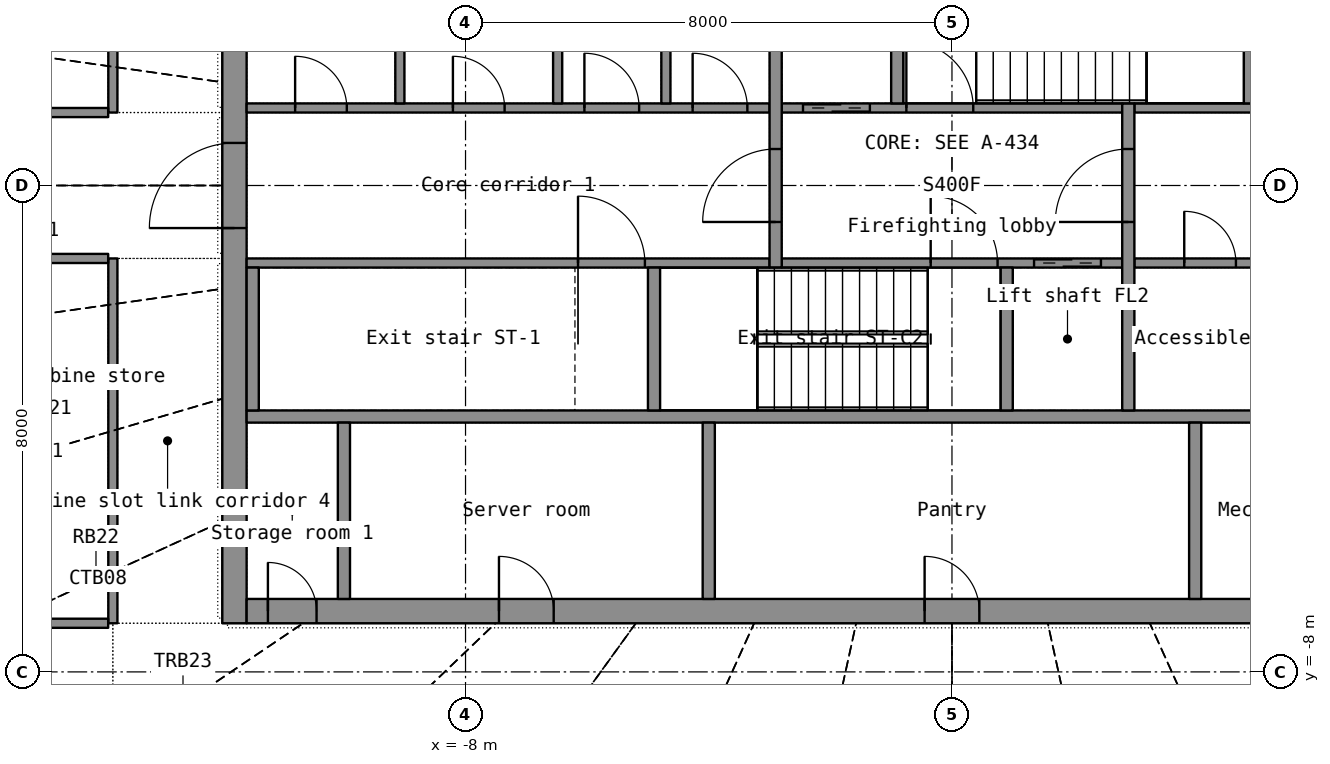
"""IFC4 building model, lengths in metres.
Left out: names, types, materials, properties, quantities, classifications, styles, units other than length and angle.
Written with IfcOpenShell. Run it as: python <this file> out.ifc"""

import sys

from ifc_helpers import new_model, si_unit, direction, frame, frame_2d, origin, place, context, subcontext, project, spatial, rectangle, extrude, element, fill, save


model = new_model("IFC4")
c1 = context("Model", 3, precision=1e-05, world=origin(), true_north=direction((0.0, 1.0)))
c2 = subcontext(c1, "Body", "Model", "MODEL_VIEW")
j1 = project(units=[si_unit("LENGTHUNIT", "METRE"), si_unit("PLANEANGLEUNIT", "RADIAN")], contexts=[c1])
p1 = place(None, origin())
s1 = spatial("IfcSite", under=j1, at=p1, CompositionType="ELEMENT")
p2 = place(p1, origin())
s2 = spatial("IfcBuilding", under=s1, at=p2, CompositionType="ELEMENT")
p3 = place(p2, frame((0.0, 0.0, 265.2)))
s3 = spatial("IfcBuildingStorey", under=s2, at=p3, CompositionType="ELEMENT", Elevation=265.2)
p4 = place(p3, frame((-11.8, -7.2, 0.0), z_axis=(0.0, 0.0, 1.0), x_axis=(0.0, 1.0, 0.0)))
e1 = element("IfcWall", 1, at=p4, inside=s3, PredefinedType="SHEAR", context=c2, shape_type="SweptSolid", body=[
    extrude(rectangle(XDim=14.4, YDim=0.4, at=frame_2d((7.2, 0.0))), origin(), (0.0, 0.0, 1.0), 6.9),
])
p5 = place(p4, frame((6.5, 0.0, 0.0)))
e2 = element("IfcOpeningElement", 2, at=p5, cuts=e1, PredefinedType="OPENING", context=c2, shape_type="SweptSolid", body=[
    extrude(rectangle(XDim=1.4, YDim=2.2, at=frame_2d((0.7, 1.1))), frame((0.0, 0.21, 0.0), z_axis=(0.0, -1.0, 0.0), x_axis=(1.0, 0.0, 0.0)), (0.0, 0.0, 1.0), 0.42),
])
p6 = place(p3, frame((-11.6, -7.0, 0.0), z_axis=(0.0, 0.0, 1.0), x_axis=(1.0, 0.0, 0.0)))
e3 = element("IfcWall", 3, at=p6, inside=s3, PredefinedType="SHEAR", context=c2, shape_type="SweptSolid", body=[
    extrude(rectangle(XDim=23.2, YDim=0.4, at=frame_2d((11.6, 0.0))), origin(), (0.0, 0.0, 1.0), 6.9),
])
p7 = place(p6, frame((20.05, 0.0, 0.0)))
e4 = element("IfcOpeningElement", 4, at=p7, cuts=e3, PredefinedType="OPENING", context=c2, shape_type="SweptSolid", body=[
    extrude(rectangle(XDim=1.1, YDim=2.2, at=frame_2d((0.55, 1.1))), frame((0.0, 0.21, 0.0), z_axis=(0.0, -1.0, 0.0), x_axis=(1.0, 0.0, 0.0)), (0.0, 0.0, 1.0), 0.42),
])
p8 = place(p6, frame((4.15, 0.0, 0.0)))
e5 = element("IfcOpeningElement", 5, at=p8, cuts=e3, PredefinedType="OPENING", context=c2, shape_type="SweptSolid", body=[
    extrude(rectangle(XDim=0.9, YDim=2.1, at=frame_2d((0.45, 1.05))), frame((0.0, 0.21, 0.0), z_axis=(0.0, -1.0, 0.0), x_axis=(1.0, 0.0, 0.0)), (0.0, 0.0, 1.0), 0.42),
])
p9 = place(p6, frame((11.15, 0.0, 0.0)))
e6 = element("IfcOpeningElement", 6, at=p9, cuts=e3, PredefinedType="OPENING", context=c2, shape_type="SweptSolid", body=[
    extrude(rectangle(XDim=0.9, YDim=2.1, at=frame_2d((0.45, 1.05))), frame((0.0, 0.21, 0.0), z_axis=(0.0, -1.0, 0.0), x_axis=(1.0, 0.0, 0.0)), (0.0, 0.0, 1.0), 0.42),
])
p10 = place(p6, frame((17.15, 0.0, 0.0)))
e7 = element("IfcOpeningElement", 7, at=p10, cuts=e3, PredefinedType="OPENING", context=c2, shape_type="SweptSolid", body=[
    extrude(rectangle(XDim=0.9, YDim=2.1, at=frame_2d((0.45, 1.05))), frame((0.0, 0.21, 0.0), z_axis=(0.0, -1.0, 0.0), x_axis=(1.0, 0.0, 0.0)), (0.0, 0.0, 1.0), 0.42),
])
p11 = place(p6, frame((0.35, 0.0, 0.0)))
e8 = element("IfcOpeningElement", 8, at=p11, cuts=e3, PredefinedType="OPENING", context=c2, shape_type="SweptSolid", body=[
    extrude(rectangle(XDim=0.8, YDim=2.05, at=frame_2d((0.4, 1.025))), frame((0.0, 0.21, 0.0), z_axis=(0.0, -1.0, 0.0), x_axis=(1.0, 0.0, 0.0)), (0.0, 0.0, 1.0), 0.42),
])
p12 = place(p6, frame((22.05, 0.0, 0.0)))
e9 = element("IfcOpeningElement", 9, at=p12, cuts=e3, PredefinedType="OPENING", context=c2, shape_type="SweptSolid", body=[
    extrude(rectangle(XDim=0.8, YDim=2.05, at=frame_2d((0.4, 1.025))), frame((0.0, 0.21, 0.0), z_axis=(0.0, -1.0, 0.0), x_axis=(1.0, 0.0, 0.0)), (0.0, 0.0, 1.0), 0.42),
])
p13 = place(p3, frame((-11.6, -3.8, 0.0), z_axis=(0.0, 0.0, 1.0), x_axis=(1.0, 0.0, 0.0)))
e10 = element("IfcWall", 10, at=p13, inside=s3, PredefinedType="SHEAR", context=c2, shape_type="SweptSolid", body=[
    extrude(rectangle(XDim=23.2, YDim=0.2, at=frame_2d((11.6, 0.0))), origin(), (0.0, 0.0, 1.0), 6.9),
])
p14 = place(p3, frame((-10.0, -6.8, 0.0), z_axis=(0.0, 0.0, 1.0), x_axis=(0.0, 1.0, 0.0)))
e11 = element("IfcWall", 11, at=p14, inside=s3, PredefinedType="SHEAR", context=c2, shape_type="SweptSolid", body=[
    extrude(rectangle(XDim=2.9, YDim=0.2, at=frame_2d((1.45, 0.0))), origin(), (0.0, 0.0, 1.0), 6.9),
])
for number, where, z_axis, x_axis in (
    (12, (-4.0, -6.8, 0.0), (0.0, 0.0, 1.0), (0.0, 1.0, 0.0)),
    (13, (4.0, -6.8, 0.0), (0.0, 0.0, 1.0), (0.0, 1.0, 0.0)),
):
    element("IfcWall", number, at=place(p3, frame(where, z_axis=z_axis, x_axis=x_axis)), inside=s3, PredefinedType="PARTITIONING", context=c2, shape_type="SweptSolid", body=[
        extrude(rectangle(XDim=2.9, YDim=0.2, at=frame_2d((1.45, 0.0))), origin(), (0.0, 0.0, 1.0), 6.9),
    ])
p15 = place(p3, frame((-11.6, -1.275, 0.0), z_axis=(0.0, 0.0, 1.0), x_axis=(1.0, 0.0, 0.0)))
e14 = element("IfcWall", 14, at=p15, inside=s3, PredefinedType="SHEAR", context=c2, shape_type="SweptSolid", body=[
    extrude(rectangle(XDim=8.6, YDim=0.15, at=frame_2d((4.3, 0.0))), origin(), (0.0, 0.0, 1.0), 6.9),
])
p16 = place(p15, frame((5.45, 0.0, 0.0)))
e15 = element("IfcOpeningElement", 15, at=p16, cuts=e14, PredefinedType="OPENING", context=c2, shape_type="SweptSolid", body=[
    extrude(rectangle(XDim=1.1, YDim=2.15, at=frame_2d((0.55, 1.075))), frame((0.0, 0.085, 0.0), z_axis=(0.0, -1.0, 0.0), x_axis=(1.0, 0.0, 0.0)), (0.0, 0.0, 1.0), 0.17),
])
p17 = place(p3, frame((-2.8, -1.275, 0.0), z_axis=(0.0, 0.0, 1.0), x_axis=(1.0, 0.0, 0.0)))
e16 = element("IfcWall", 16, at=p17, inside=s3, PredefinedType="SHEAR", context=c2, shape_type="SweptSolid", body=[
    extrude(rectangle(XDim=5.6, YDim=0.15, at=frame_2d((2.8, 0.0))), origin(), (0.0, 0.0, 1.0), 6.9),
])
p18 = place(p17, frame((4.15, 0.0, 0.0)))
e17 = element("IfcOpeningElement", 17, at=p18, cuts=e16, PredefinedType="OPENING", context=c2, shape_type="SweptSolid", body=[
    extrude(rectangle(XDim=1.1, YDim=2.2, at=frame_2d((0.55, 1.1))), frame((0.0, 0.085, 0.0), z_axis=(0.0, -1.0, 0.0), x_axis=(1.0, 0.0, 0.0)), (0.0, 0.0, 1.0), 0.17),
])
p19 = place(p17, frame((2.45, 0.0, 0.0)))
e18 = element("IfcOpeningElement", 18, at=p19, cuts=e16, PredefinedType="OPENING", context=c2, shape_type="SweptSolid", body=[
    extrude(rectangle(XDim=1.1, YDim=2.15, at=frame_2d((0.55, 1.075))), frame((0.0, 0.085, 0.0), z_axis=(0.0, -1.0, 0.0), x_axis=(1.0, 0.0, 0.0)), (0.0, 0.0, 1.0), 0.17),
])
p20 = place(p3, frame((3.0, -1.275, 0.0), z_axis=(0.0, 0.0, 1.0), x_axis=(1.0, 0.0, 0.0)))
e19 = element("IfcWall", 19, at=p20, inside=s3, PredefinedType="PARTITIONING", context=c2, shape_type="SweptSolid", body=[
    extrude(rectangle(XDim=8.6, YDim=0.15, at=frame_2d((4.3, 0.0))), origin(), (0.0, 0.0, 1.0), 6.9),
])
p21 = place(p20, frame((0.82, 0.0, 0.0)))
e20 = element("IfcOpeningElement", 20, at=p21, cuts=e19, PredefinedType="OPENING", context=c2, shape_type="SweptSolid", body=[
    extrude(rectangle(XDim=0.85, YDim=2.1, at=frame_2d((0.425, 1.05))), frame((0.0, 0.085, 0.0), z_axis=(0.0, -1.0, 0.0), x_axis=(1.0, 0.0, 0.0)), (0.0, 0.0, 1.0), 0.17),
])
p22 = place(p20, frame((3.103, 0.0, 0.0)))
e21 = element("IfcOpeningElement", 21, at=p22, cuts=e19, PredefinedType="OPENING", context=c2, shape_type="SweptSolid", body=[
    extrude(rectangle(XDim=0.9, YDim=2.1, at=frame_2d((0.45, 1.05))), frame((0.0, 0.085, 0.0), z_axis=(0.0, -1.0, 0.0), x_axis=(1.0, 0.0, 0.0)), (0.0, 0.0, 1.0), 0.17),
])
p23 = place(p20, frame((6.158, 0.0, 0.0)))
e22 = element("IfcOpeningElement", 22, at=p23, cuts=e19, PredefinedType="OPENING", context=c2, shape_type="SweptSolid", body=[
    extrude(rectangle(XDim=0.9, YDim=2.1, at=frame_2d((0.45, 1.05))), frame((0.0, 0.085, 0.0), z_axis=(0.0, -1.0, 0.0), x_axis=(1.0, 0.0, 0.0)), (0.0, 0.0, 1.0), 0.17),
])
p24 = place(p3, frame((-11.6, 1.275, 0.0), z_axis=(0.0, 0.0, 1.0), x_axis=(1.0, 0.0, 0.0)))
e23 = element("IfcWall", 23, at=p24, inside=s3, PredefinedType="PARTITIONING", context=c2, shape_type="SweptSolid", body=[
    extrude(rectangle(XDim=8.6, YDim=0.15, at=frame_2d((4.3, 0.0))), origin(), (0.0, 0.0, 1.0), 6.9),
])
p25 = place(p24, frame((0.798, 0.0, 0.0)))
e24 = element("IfcOpeningElement", 24, at=p25, cuts=e23, PredefinedType="OPENING", context=c2, shape_type="SweptSolid", body=[
    extrude(rectangle(XDim=0.85, YDim=2.1, at=frame_2d((0.425, 1.05))), frame((0.0, 0.085, 0.0), z_axis=(0.0, -1.0, 0.0), x_axis=(1.0, 0.0, 0.0)), (0.0, 0.0, 1.0), 0.17),
])
p26 = place(p24, frame((3.393, 0.0, 0.0)))
e25 = element("IfcOpeningElement", 25, at=p26, cuts=e23, PredefinedType="OPENING", context=c2, shape_type="SweptSolid", body=[
    extrude(rectangle(XDim=0.85, YDim=2.1, at=frame_2d((0.425, 1.05))), frame((0.0, 0.085, 0.0), z_axis=(0.0, -1.0, 0.0), x_axis=(1.0, 0.0, 0.0)), (0.0, 0.0, 1.0), 0.17),
])
p27 = place(p24, frame((5.555, 0.0, 0.0)))
e26 = element("IfcOpeningElement", 26, at=p27, cuts=e23, PredefinedType="OPENING", context=c2, shape_type="SweptSolid", body=[
    extrude(rectangle(XDim=0.9, YDim=2.1, at=frame_2d((0.45, 1.05))), frame((0.0, 0.085, 0.0), z_axis=(0.0, -1.0, 0.0), x_axis=(1.0, 0.0, 0.0)), (0.0, 0.0, 1.0), 0.17),
])
p28 = place(p24, frame((7.335, 0.0, 0.0)))
e27 = element("IfcOpeningElement", 27, at=p28, cuts=e23, PredefinedType="OPENING", context=c2, shape_type="SweptSolid", body=[
    extrude(rectangle(XDim=0.9, YDim=2.1, at=frame_2d((0.45, 1.05))), frame((0.0, 0.085, 0.0), z_axis=(0.0, -1.0, 0.0), x_axis=(1.0, 0.0, 0.0)), (0.0, 0.0, 1.0), 0.17),
])
p29 = place(p3, frame((-2.8, 1.275, 0.0), z_axis=(0.0, 0.0, 1.0), x_axis=(1.0, 0.0, 0.0)))
e28 = element("IfcWall", 28, at=p29, inside=s3, PredefinedType="SHEAR", context=c2, shape_type="SweptSolid", body=[
    extrude(rectangle(XDim=5.6, YDim=0.15, at=frame_2d((2.8, 0.0))), origin(), (0.0, 0.0, 1.0), 6.9),
])
p30 = place(p29, frame((0.35, 0.0, 0.0)))
e29 = element("IfcOpeningElement", 29, at=p30, cuts=e28, PredefinedType="OPENING", context=c2, shape_type="SweptSolid", body=[
    extrude(rectangle(XDim=1.1, YDim=2.2, at=frame_2d((0.55, 1.1))), frame((0.0, 0.085, 0.0), z_axis=(0.0, -1.0, 0.0), x_axis=(1.0, 0.0, 0.0)), (0.0, 0.0, 1.0), 0.17),
])
p31 = place(p29, frame((2.05, 0.0, 0.0)))
e30 = element("IfcOpeningElement", 30, at=p31, cuts=e28, PredefinedType="OPENING", context=c2, shape_type="SweptSolid", body=[
    extrude(rectangle(XDim=1.1, YDim=2.15, at=frame_2d((0.55, 1.075))), frame((0.0, 0.085, 0.0), z_axis=(0.0, -1.0, 0.0), x_axis=(1.0, 0.0, 0.0)), (0.0, 0.0, 1.0), 0.17),
])
p32 = place(p3, frame((3.0, 1.275, 0.0), z_axis=(0.0, 0.0, 1.0), x_axis=(1.0, 0.0, 0.0)))
e31 = element("IfcWall", 31, at=p32, inside=s3, PredefinedType="SHEAR", context=c2, shape_type="SweptSolid", body=[
    extrude(rectangle(XDim=8.6, YDim=0.15, at=frame_2d((4.3, 0.0))), origin(), (0.0, 0.0, 1.0), 6.9),
])
p33 = place(p32, frame((2.05, 0.0, 0.0)))
e32 = element("IfcOpeningElement", 32, at=p33, cuts=e31, PredefinedType="OPENING", context=c2, shape_type="SweptSolid", body=[
    extrude(rectangle(XDim=1.1, YDim=2.15, at=frame_2d((0.55, 1.075))), frame((0.0, 0.085, 0.0), z_axis=(0.0, -1.0, 0.0), x_axis=(1.0, 0.0, 0.0)), (0.0, 0.0, 1.0), 0.17),
])
p34 = place(p3, frame((-2.9, -1.35, 0.0), z_axis=(0.0, 0.0, 1.0), x_axis=(0.0, 1.0, 0.0)))
e33 = element("IfcWall", 33, at=p34, inside=s3, PredefinedType="SHEAR", context=c2, shape_type="SweptSolid", body=[
    extrude(rectangle(XDim=5.05, YDim=0.2, at=frame_2d((2.525, 0.0))), origin(), (0.0, 0.0, 1.0), 6.9),
])
p35 = place(p34, frame((0.75, 0.0, 0.0)))
e34 = element("IfcOpeningElement", 34, at=p35, cuts=e33, PredefinedType="OPENING", context=c2, shape_type="SweptSolid", body=[
    extrude(rectangle(XDim=1.2, YDim=2.2, at=frame_2d((0.6, 1.1))), frame((0.0, 0.11, 0.0), z_axis=(0.0, -1.0, 0.0), x_axis=(1.0, 0.0, 0.0)), (0.0, 0.0, 1.0), 0.22),
])
p36 = place(p3, frame((2.9, -3.7, 0.0), z_axis=(0.0, 0.0, 1.0), x_axis=(0.0, 1.0, 0.0)))
e35 = element("IfcWall", 35, at=p36, inside=s3, PredefinedType="SHEAR", context=c2, shape_type="SweptSolid", body=[
    extrude(rectangle(XDim=5.05, YDim=0.2, at=frame_2d((2.525, 0.0))), origin(), (0.0, 0.0, 1.0), 6.9),
])
p37 = place(p36, frame((3.1, 0.0, 0.0)))
e36 = element("IfcOpeningElement", 36, at=p37, cuts=e35, PredefinedType="OPENING", context=c2, shape_type="SweptSolid", body=[
    extrude(rectangle(XDim=1.2, YDim=2.2, at=frame_2d((0.6, 1.1))), frame((0.0, 0.11, 0.0), z_axis=(0.0, -1.0, 0.0), x_axis=(1.0, 0.0, 0.0)), (0.0, 0.0, 1.0), 0.22),
])
for number, where, z_axis, x_axis in (
    (37, (-0.9, 1.35, 0.0), (0.0, 0.0, 1.0), (0.0, 1.0, 0.0)),
    (38, (0.9, -3.7, 0.0), (0.0, 0.0, 1.0), (0.0, 1.0, 0.0)),
    (39, (-11.5, -3.7, 0.0), (0.0, 0.0, 1.0), (0.0, 1.0, 0.0)),
    (40, (-4.9, -3.7, 0.0), (0.0, 0.0, 1.0), (0.0, 1.0, 0.0)),
    (41, (4.9, 1.35, 0.0), (0.0, 0.0, 1.0), (0.0, 1.0, 0.0)),
):
    element("IfcWall", number, at=place(p3, frame(where, z_axis=z_axis, x_axis=x_axis)), inside=s3, PredefinedType="SHEAR", context=c2, shape_type="SweptSolid", body=[
        extrude(rectangle(XDim=2.35, YDim=0.2, at=frame_2d((1.175, 0.0))), origin(), (0.0, 0.0, 1.0), 6.9),
    ])
for number, where, z_axis, x_axis in (
    (42, (-9.08, 1.35, 0.0), (0.0, 0.0, 1.0), (0.0, 1.0, 0.0)),
    (43, (-6.485, 1.35, 0.0), (0.0, 0.0, 1.0), (0.0, 1.0, 0.0)),
    (44, (-4.705, 1.35, 0.0), (0.0, 0.0, 1.0), (0.0, 1.0, 0.0)),
):
    element("IfcWall", number, at=place(p3, frame(where, z_axis=z_axis, x_axis=x_axis)), inside=s3, PredefinedType="PARTITIONING", context=c2, shape_type="SweptSolid", body=[
        extrude(rectangle(XDim=2.35, YDim=0.15, at=frame_2d((1.175, 0.0))), origin(), (0.0, 0.0, 1.0), 6.9),
    ])
for number, where, z_axis, x_axis in (
    (45, (-13.8, -1.2, 0.0), (0.0, 0.0, 1.0), (0.0, -1.0, 0.0)),
    (46, (-13.8, 7.2, 0.0), (0.0, 0.0, 1.0), (0.0, -1.0, 0.0)),
):
    element("IfcWall", number, at=place(p3, frame(where, z_axis=z_axis, x_axis=x_axis)), inside=s3, PredefinedType="PARTITIONING", context=c2, shape_type="SweptSolid", body=[
        extrude(rectangle(XDim=6.0, YDim=0.15, at=frame_2d((3.0, 0.0))), origin(), (0.0, 0.0, 1.0), 6.1),
    ])
for number, where, z_axis, x_axis in (
    (47, (-16.423, -7.2, 0.0), (0.0, 0.0, 1.0), (1.0, 0.0, 0.0)),
    (48, (-16.423, -1.2, 0.0), (0.0, 0.0, 1.0), (1.0, 0.0, 0.0)),
    (49, (-13.877, 1.2, 0.0), (0.0, 0.0, 1.0), (-1.0, 0.0, 0.0)),
):
    element("IfcWall", number, at=place(p3, frame(where, z_axis=z_axis, x_axis=x_axis)), inside=s3, PredefinedType="PARTITIONING", context=c2, shape_type="SweptSolid", body=[
        extrude(rectangle(XDim=2.546, YDim=0.15, at=frame_2d((1.273, 0.0))), origin(), (0.0, 0.0, 1.0), 6.1),
    ])
p38 = place(p8, origin())
e50 = element("IfcDoor", 50, at=p38, inside=s3, OperationType="SINGLE_SWING_LEFT", PredefinedType="DOOR", context=c2, shape_type="SweptSolid", body=[
    extrude(rectangle(XDim=0.9, YDim=2.1, at=frame_2d((0.45, 1.05))), frame((0.0, 0.025, 0.0), z_axis=(0.0, -1.0, 0.0), x_axis=(1.0, 0.0, 0.0)), (0.0, 0.0, 1.0), 0.05),
])
fill(e5, e50)
p39 = place(p9, origin())
e51 = element("IfcDoor", 51, at=p39, inside=s3, OperationType="SINGLE_SWING_LEFT", PredefinedType="DOOR", context=c2, shape_type="SweptSolid", body=[
    extrude(rectangle(XDim=0.9, YDim=2.1, at=frame_2d((0.45, 1.05))), frame((0.0, 0.025, 0.0), z_axis=(0.0, -1.0, 0.0), x_axis=(1.0, 0.0, 0.0)), (0.0, 0.0, 1.0), 0.05),
])
fill(e6, e51)
p40 = place(p11, origin())
e52 = element("IfcDoor", 52, at=p40, inside=s3, OperationType="SINGLE_SWING_LEFT", PredefinedType="DOOR", context=c2, shape_type="SweptSolid", body=[
    extrude(rectangle(XDim=0.8, YDim=2.05, at=frame_2d((0.4, 1.025))), frame((0.0, 0.025, 0.0), z_axis=(0.0, -1.0, 0.0), x_axis=(1.0, 0.0, 0.0)), (0.0, 0.0, 1.0), 0.05),
])
fill(e8, e52)
p41 = place(p5, origin())
e53 = element("IfcDoor", 53, at=p41, inside=s3, OperationType="DOUBLE_DOOR_SINGLE_SWING", PredefinedType="DOOR", context=c2, shape_type="SweptSolid", body=[
    extrude(rectangle(XDim=1.4, YDim=2.2, at=frame_2d((0.7, 1.1))), frame((0.0, 0.025, 0.0), z_axis=(0.0, -1.0, 0.0), x_axis=(1.0, 0.0, 0.0)), (0.0, 0.0, 1.0), 0.05),
])
fill(e2, e53)
p42 = place(p35, origin())
e54 = element("IfcDoor", 54, at=p42, inside=s3, OperationType="SINGLE_SWING_LEFT", PredefinedType="DOOR", context=c2, shape_type="SweptSolid", body=[
    extrude(rectangle(XDim=1.2, YDim=2.2, at=frame_2d((0.6, 1.1))), frame((0.0, 0.025, 0.0), z_axis=(0.0, -1.0, 0.0), x_axis=(1.0, 0.0, 0.0)), (0.0, 0.0, 1.0), 0.05),
])
fill(e34, e54)
p43 = place(p37, origin())
e55 = element("IfcDoor", 55, at=p43, inside=s3, OperationType="SINGLE_SWING_LEFT", PredefinedType="DOOR", context=c2, shape_type="SweptSolid", body=[
    extrude(rectangle(XDim=1.2, YDim=2.2, at=frame_2d((0.6, 1.1))), frame((0.0, 0.025, 0.0), z_axis=(0.0, -1.0, 0.0), x_axis=(1.0, 0.0, 0.0)), (0.0, 0.0, 1.0), 0.05),
])
fill(e36, e55)
p44 = place(p30, origin())
e56 = element("IfcDoor", 56, at=p44, inside=s3, OperationType="DOUBLE_DOOR_SLIDING", PredefinedType="DOOR", context=c2, shape_type="SweptSolid", body=[
    extrude(rectangle(XDim=1.1, YDim=2.2, at=frame_2d((0.55, 1.1))), frame((0.0, 0.025, 0.0), z_axis=(0.0, -1.0, 0.0), x_axis=(1.0, 0.0, 0.0)), (0.0, 0.0, 1.0), 0.05),
])
fill(e29, e56)
p45 = place(p18, origin())
e57 = element("IfcDoor", 57, at=p45, inside=s3, OperationType="DOUBLE_DOOR_SLIDING", PredefinedType="DOOR", context=c2, shape_type="SweptSolid", body=[
    extrude(rectangle(XDim=1.1, YDim=2.2, at=frame_2d((0.55, 1.1))), frame((0.0, 0.025, 0.0), z_axis=(0.0, -1.0, 0.0), x_axis=(1.0, 0.0, 0.0)), (0.0, 0.0, 1.0), 0.05),
])
fill(e17, e57)
p46 = place(p16, origin())
e58 = element("IfcDoor", 58, at=p46, inside=s3, OperationType="SINGLE_SWING_LEFT", PredefinedType="DOOR", context=c2, shape_type="SweptSolid", body=[
    extrude(rectangle(XDim=1.1, YDim=2.15, at=frame_2d((0.55, 1.075))), frame((0.0, 0.025, 0.0), z_axis=(0.0, -1.0, 0.0), x_axis=(1.0, 0.0, 0.0)), (0.0, 0.0, 1.0), 0.05),
])
fill(e15, e58)
p47 = place(p25, origin())
e59 = element("IfcDoor", 59, at=p47, inside=s3, OperationType="SINGLE_SWING_LEFT", PredefinedType="DOOR", context=c2, shape_type="SweptSolid", body=[
    extrude(rectangle(XDim=0.85, YDim=2.1, at=frame_2d((0.425, 1.05))), frame((0.0, 0.025, 0.0), z_axis=(0.0, -1.0, 0.0), x_axis=(1.0, 0.0, 0.0)), (0.0, 0.0, 1.0), 0.05),
])
fill(e24, e59)
p48 = place(p26, origin())
e60 = element("IfcDoor", 60, at=p48, inside=s3, OperationType="SINGLE_SWING_LEFT", PredefinedType="DOOR", context=c2, shape_type="SweptSolid", body=[
    extrude(rectangle(XDim=0.85, YDim=2.1, at=frame_2d((0.425, 1.05))), frame((0.0, 0.025, 0.0), z_axis=(0.0, -1.0, 0.0), x_axis=(1.0, 0.0, 0.0)), (0.0, 0.0, 1.0), 0.05),
])
fill(e25, e60)
p49 = place(p27, origin())
e61 = element("IfcDoor", 61, at=p49, inside=s3, OperationType="SINGLE_SWING_LEFT", PredefinedType="DOOR", context=c2, shape_type="SweptSolid", body=[
    extrude(rectangle(XDim=0.9, YDim=2.1, at=frame_2d((0.45, 1.05))), frame((0.0, 0.025, 0.0), z_axis=(0.0, -1.0, 0.0), x_axis=(1.0, 0.0, 0.0)), (0.0, 0.0, 1.0), 0.05),
])
fill(e26, e61)
p50 = place(p28, origin())
e62 = element("IfcDoor", 62, at=p50, inside=s3, OperationType="SINGLE_SWING_LEFT", PredefinedType="DOOR", context=c2, shape_type="SweptSolid", body=[
    extrude(rectangle(XDim=0.9, YDim=2.1, at=frame_2d((0.45, 1.05))), frame((0.0, 0.025, 0.0), z_axis=(0.0, -1.0, 0.0), x_axis=(1.0, 0.0, 0.0)), (0.0, 0.0, 1.0), 0.05),
])
fill(e27, e62)
p51 = place(p21, origin())
e63 = element("IfcDoor", 63, at=p51, inside=s3, OperationType="SINGLE_SWING_LEFT", PredefinedType="DOOR", context=c2, shape_type="SweptSolid", body=[
    extrude(rectangle(XDim=0.85, YDim=2.1, at=frame_2d((0.425, 1.05))), frame((0.0, 0.025, 0.0), z_axis=(0.0, -1.0, 0.0), x_axis=(1.0, 0.0, 0.0)), (0.0, 0.0, 1.0), 0.05),
])
fill(e20, e63)
p52 = place(p31, origin())
e64 = element("IfcDoor", 64, at=p52, inside=s3, OperationType="SINGLE_SWING_LEFT", PredefinedType="DOOR", context=c2, shape_type="SweptSolid", body=[
    extrude(rectangle(XDim=1.1, YDim=2.15, at=frame_2d((0.55, 1.075))), frame((0.0, 0.025, 0.0), z_axis=(0.0, -1.0, 0.0), x_axis=(1.0, 0.0, 0.0)), (0.0, 0.0, 1.0), 0.05),
])
fill(e30, e64)
p53 = place(p19, origin())
e65 = element("IfcDoor", 65, at=p53, inside=s3, OperationType="SINGLE_SWING_LEFT", PredefinedType="DOOR", context=c2, shape_type="SweptSolid", body=[
    extrude(rectangle(XDim=1.1, YDim=2.15, at=frame_2d((0.55, 1.075))), frame((0.0, 0.025, 0.0), z_axis=(0.0, -1.0, 0.0), x_axis=(1.0, 0.0, 0.0)), (0.0, 0.0, 1.0), 0.05),
])
fill(e18, e65)
save(model, sys.argv[1])
